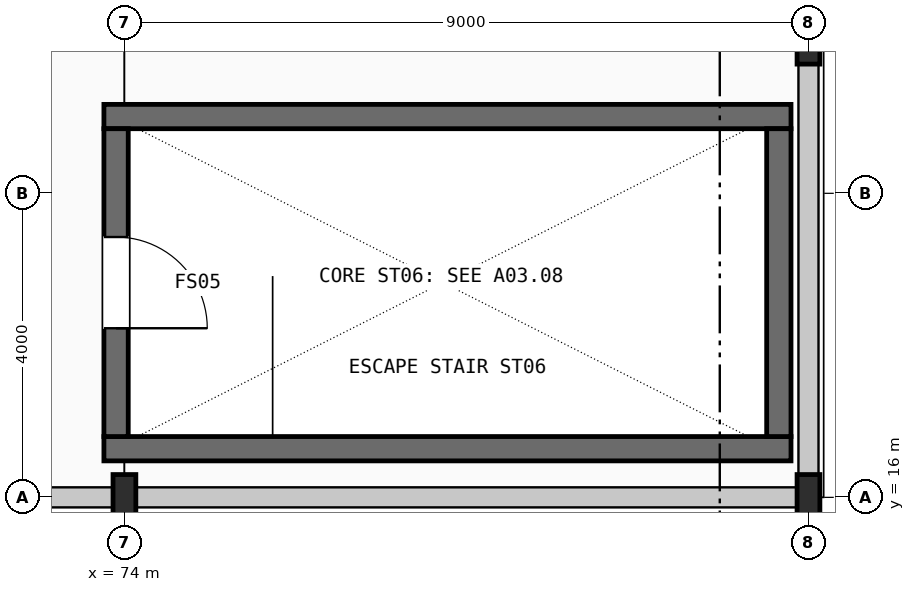
"""IFC4 building model, lengths in metres.
Left out: names, types, materials, properties, quantities, classifications, styles, units other than length and angle.
Written with IfcOpenShell. Run it as: python <this file> out.ifc"""

import sys

from ifc_helpers import new_model, si_unit, direction, frame, frame_2d, origin, origin_2d, place, context, subcontext, project, spatial, rectangle, i_section, extrude, element, fill, save


model = new_model("IFC4")
c1 = context("Model", 3, precision=1e-05, world=origin(), true_north=direction((0.0, 1.0)))
c2 = subcontext(c1, "Body", "Model", "MODEL_VIEW")
j1 = project(units=[si_unit("LENGTHUNIT", "METRE"), si_unit("PLANEANGLEUNIT", "RADIAN")], contexts=[c1])
p1 = place(None, origin())
s1 = spatial("IfcSite", under=j1, at=p1, CompositionType="ELEMENT")
p2 = place(p1, origin())
s2 = spatial("IfcBuilding", under=s1, at=p2, CompositionType="ELEMENT")
p3 = place(p2, frame((0.0, 0.0, 16.8)))
s3 = spatial("IfcBuildingStorey", under=s2, at=p3, CompositionType="ELEMENT", Elevation=16.8)
for number, where, z_axis, x_axis in (
    (1, (74.0, 16.0, 0.0), (0.0, 0.0, 1.0), (1.0, 0.0, 0.0)),
    (2, (83.0, 16.0, 0.0), (0.0, 0.0, 1.0), (1.0, 0.0, 0.0)),
    (3, (83.0, 22.0, 0.0), (0.0, 0.0, 1.0), (1.0, 0.0, 0.0)),
):
    element("IfcColumn", number, at=place(p3, frame(where, z_axis=z_axis, x_axis=x_axis)), inside=s3, PredefinedType="COLUMN", context=c2, shape_type="SweptSolid", body=[
        extrude(i_section(OverallWidth=0.3, OverallDepth=0.6, WebThickness=0.015, FlangeThickness=0.03, FilletRadius=0.027, at=origin_2d()), origin(), (0.0, 0.0, 1.0), 5.2),
    ])
for number, where, z_axis, x_axis in (
    (4, (73.73, 16.64, 0.0), (0.0, 0.0, 1.0), (1.0, 0.0, 0.0)),
    (5, (73.73, 21.01, 0.0), (0.0, 0.0, 1.0), (1.0, 0.0, 0.0)),
):
    element("IfcWall", number, at=place(p3, frame(where, z_axis=z_axis, x_axis=x_axis)), inside=s3, PredefinedType="SHEAR", context=c2, shape_type="SweptSolid", body=[
        extrude(rectangle(XDim=9.04, YDim=0.32, at=frame_2d((4.52, 0.0))), origin(), (0.0, 0.0, 1.0), 4.2),
    ])
p4 = place(p3, frame((73.89, 16.8, 0.0), z_axis=(0.0, 0.0, 1.0), x_axis=(0.0, 1.0, 0.0)))
e6 = element("IfcWall", 6, at=p4, inside=s3, PredefinedType="SHEAR", context=c2, shape_type="SweptSolid", body=[
    extrude(rectangle(XDim=4.05, YDim=0.32, at=frame_2d((2.025, 0.0))), origin(), (0.0, 0.0, 1.0), 4.2),
])
p5 = place(p4, frame((1.425, 0.0, 0.0)))
e7 = element("IfcOpeningElement", 7, at=p5, cuts=e6, PredefinedType="OPENING", context=c2, shape_type="SweptSolid", body=[
    extrude(rectangle(XDim=1.2, YDim=2.2, at=frame_2d((0.6, 1.1))), frame((0.0, 0.17, 0.0), z_axis=(0.0, -1.0, 0.0), x_axis=(1.0, 0.0, 0.0)), (0.0, 0.0, 1.0), 0.34),
])
p6 = place(p3, frame((82.61, 16.8, 0.0), z_axis=(0.0, 0.0, 1.0), x_axis=(0.0, 1.0, 0.0)))
e8 = element("IfcWall", 8, at=p6, inside=s3, PredefinedType="SHEAR", context=c2, shape_type="SweptSolid", body=[
    extrude(rectangle(XDim=4.05, YDim=0.32, at=frame_2d((2.025, 0.0))), origin(), (0.0, 0.0, 1.0), 4.2),
])
p7 = place(p3, frame((65.146, 16.0, 0.0), z_axis=(0.0, 0.0, 1.0), x_axis=(1.0, 0.0, 0.0)))
e9 = element("IfcWall", 9, at=p7, inside=s3, PredefinedType="STANDARD", context=c2, shape_type="SweptSolid", body=[
    extrude(rectangle(XDim=8.708, YDim=0.264, at=frame_2d((4.354, 0.0))), origin(), (0.0, 0.0, 1.0), 4.4),
])
p8 = place(p3, frame((74.146, 16.0, 0.0), z_axis=(0.0, 0.0, 1.0), x_axis=(1.0, 0.0, 0.0)))
e10 = element("IfcWall", 10, at=p8, inside=s3, PredefinedType="STANDARD", context=c2, shape_type="SweptSolid", body=[
    extrude(rectangle(XDim=8.708, YDim=0.264, at=frame_2d((4.354, 0.0))), origin(), (0.0, 0.0, 1.0), 3.985),
])
p9 = place(p3, frame((83.0, 16.296, 0.0), z_axis=(0.0, 0.0, 1.0), x_axis=(0.0, 1.0, 0.0)))
e11 = element("IfcWall", 11, at=p9, inside=s3, PredefinedType="STANDARD", context=c2, shape_type="SweptSolid", body=[
    extrude(rectangle(XDim=5.408, YDim=0.264, at=frame_2d((2.704, 0.0))), origin(), (0.0, 0.0, 1.0), 3.985),
])
p10 = place(p5, frame((1.2, 0.0, 0.0), z_axis=(0.0, 0.0, 1.0), x_axis=(-1.0, 0.0, 0.0)))
e12 = element("IfcDoor", 12, at=p10, inside=s3, OperationType="SINGLE_SWING_RIGHT", PredefinedType="DOOR", context=c2, shape_type="SweptSolid", body=[
    extrude(rectangle(XDim=1.2, YDim=2.2, at=frame_2d((0.6, 1.1))), frame((0.0, 0.025, 0.0), z_axis=(0.0, -1.0, 0.0), x_axis=(1.0, 0.0, 0.0)), (0.0, 0.0, 1.0), 0.05),
])
fill(e7, e12)
save(model, sys.argv[1])
